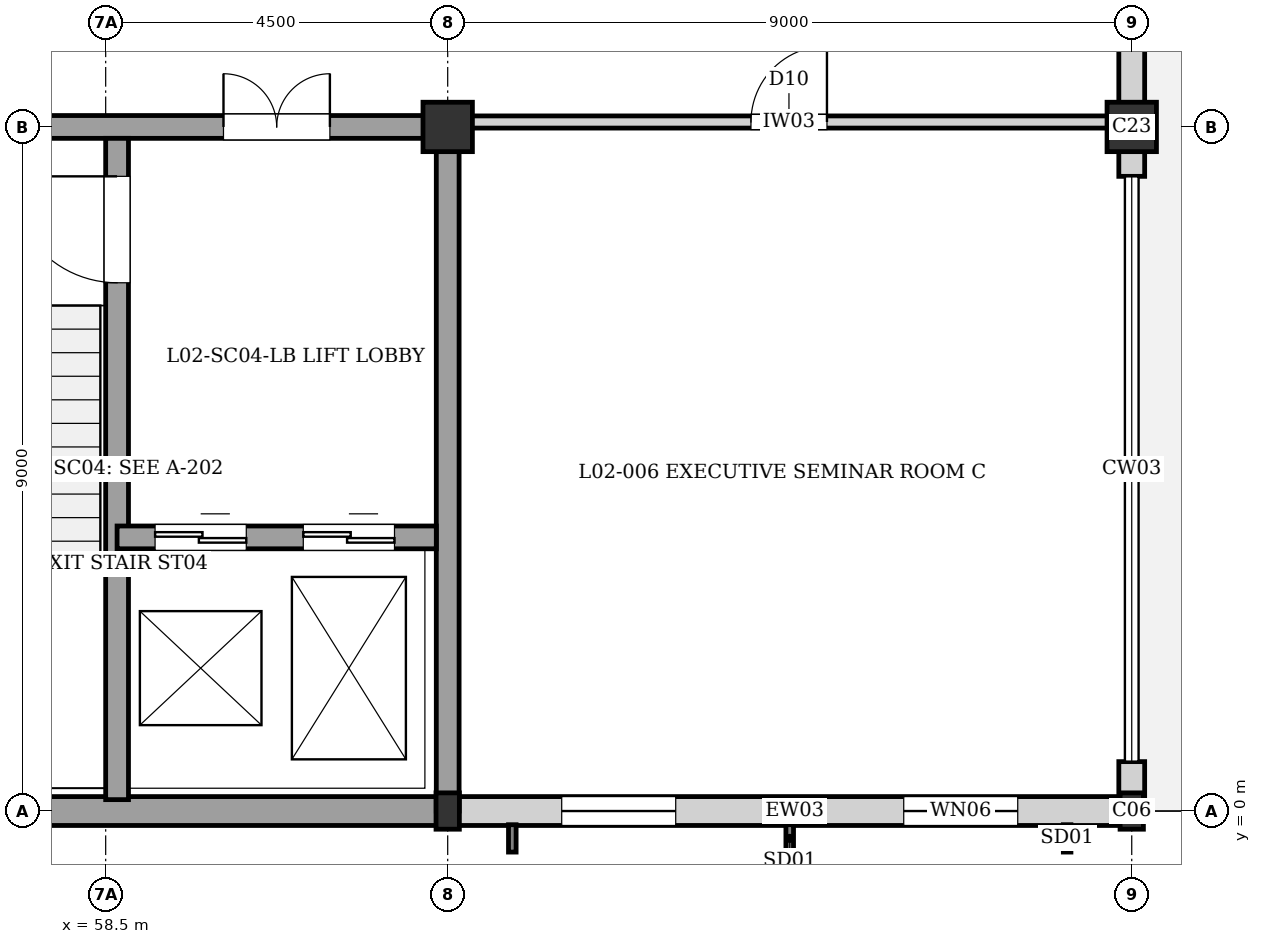
"""IFC4 building model, lengths in metres.
Left out: names, types, materials, properties, quantities, classifications, styles, units other than length and angle.
Written with IfcOpenShell. Run it as: python <this file> out.ifc"""

import sys

from ifc_helpers import new_model, si_unit, direction, frame, frame_2d, origin, origin_2d, place, context, subcontext, project, spatial, rectangle, i_section, extrude, element, fill, save


model = new_model("IFC4")
c1 = context("Model", 3, precision=1e-05, world=origin(), true_north=direction((0.0, 1.0)))
c2 = subcontext(c1, "Body", "Model", "MODEL_VIEW")
j1 = project(units=[si_unit("LENGTHUNIT", "METRE"), si_unit("PLANEANGLEUNIT", "RADIAN")], contexts=[c1])
p1 = place(None, origin())
s1 = spatial("IfcSite", under=j1, at=p1, CompositionType="ELEMENT")
p2 = place(p1, origin())
s2 = spatial("IfcBuilding", under=s1, at=p2, CompositionType="ELEMENT")
p3 = place(p2, frame((0.0, 0.0, 8.16)))
s3 = spatial("IfcBuildingStorey", under=s2, at=p3, CompositionType="ELEMENT", Elevation=8.16)
p4 = place(p3, frame((63.0, 0.0, 0.0), z_axis=(0.0, 0.0, 1.0), x_axis=(1.0, 0.0, 0.0)))
e1 = element("IfcColumn", 1, at=p4, inside=s3, PredefinedType="COLUMN", context=c2, shape_type="SweptSolid", body=[
    extrude(i_section(OverallWidth=0.307, OverallDepth=0.478, WebThickness=0.021, FlangeThickness=0.04, at=origin_2d()), origin(), (0.0, 0.0, 1.0), 3.36),
])
p5 = place(p3, frame((63.0, 9.0, 0.0), z_axis=(0.0, 0.0, 1.0), x_axis=(1.0, 0.0, 0.0)))
e2 = element("IfcColumn", 2, at=p5, inside=s3, PredefinedType="COLUMN", context=c2, shape_type="SweptSolid", body=[
    extrude(rectangle(XDim=0.65, YDim=0.65, at=origin_2d()), origin(), (0.0, 0.0, 1.0), 3.36),
])
p6 = place(p3, frame((72.0, 0.0, 0.0), z_axis=(0.0, 0.0, 1.0), x_axis=(1.0, 0.0, 0.0)))
e3 = element("IfcColumn", 3, at=p6, inside=s3, PredefinedType="COLUMN", context=c2, shape_type="SweptSolid", body=[
    extrude(i_section(OverallWidth=0.307, OverallDepth=0.478, WebThickness=0.021, FlangeThickness=0.04, at=origin_2d()), origin(), (0.0, 0.0, 1.0), 3.36),
])
p7 = place(p3, frame((72.0, 9.0, 0.0), z_axis=(0.0, 0.0, 1.0), x_axis=(1.0, 0.0, 0.0)))
e4 = element("IfcColumn", 4, at=p7, inside=s3, PredefinedType="COLUMN", context=c2, shape_type="SweptSolid", body=[
    extrude(rectangle(XDim=0.65, YDim=0.65, at=origin_2d()), origin(), (0.0, 0.0, 1.0), 3.36),
])
p8 = place(p3, frame((72.0, 17.845, 0.0), z_axis=(0.0, 0.0, 1.0), x_axis=(0.0, -1.0, 0.0)))
e5 = element("IfcWall", 5, at=p8, inside=s3, PredefinedType="SOLIDWALL", context=c2, shape_type="SweptSolid", body=[
    extrude(rectangle(XDim=8.845, YDim=0.34, at=frame_2d((4.422, 0.0))), origin(), (0.0, 0.0, 1.0), 2.74),
])
p9 = place(p8, frame((1.345, 0.0, 0.35)))
e6 = element("IfcOpeningElement", 6, at=p9, cuts=e5, PredefinedType="OPENING", context=c2, shape_type="SweptSolid", body=[
    extrude(rectangle(XDim=1.5, YDim=1.8, at=frame_2d((0.75, 0.9))), frame((0.0, 0.18, 0.0), z_axis=(0.0, -1.0, 0.0), x_axis=(1.0, 0.0, 0.0)), (0.0, 0.0, 1.0), 0.36),
])
p10 = place(p8, frame((5.845, 0.0, 0.35)))
e7 = element("IfcOpeningElement", 7, at=p10, cuts=e5, PredefinedType="OPENING", context=c2, shape_type="SweptSolid", body=[
    extrude(rectangle(XDim=1.5, YDim=1.8, at=frame_2d((0.75, 0.9))), frame((0.0, 0.18, 0.0), z_axis=(0.0, -1.0, 0.0), x_axis=(1.0, 0.0, 0.0)), (0.0, 0.0, 1.0), 0.36),
])
p11 = place(p3, frame((72.0, 9.0, 0.0), z_axis=(0.0, 0.0, 1.0), x_axis=(0.0, -1.0, 0.0)))
e8 = element("IfcWall", 8, at=p11, inside=s3, PredefinedType="SOLIDWALL", context=c2, shape_type="SweptSolid", body=[
    extrude(rectangle(XDim=0.65, YDim=0.34, at=frame_2d((0.325, 0.0))), origin(), (0.0, 0.0, 1.0), 2.8),
])
p12 = place(p3, frame((72.0, 0.65, 0.0), z_axis=(0.0, 0.0, 1.0), x_axis=(0.0, -1.0, 0.0)))
e9 = element("IfcWall", 9, at=p12, inside=s3, PredefinedType="SOLIDWALL", context=c2, shape_type="SweptSolid", body=[
    extrude(rectangle(XDim=0.495, YDim=0.34, at=frame_2d((0.248, 0.0))), origin(), (0.0, 0.0, 1.0), 3.14),
])
p13 = place(p3, frame((72.0, 0.0, 0.0), z_axis=(0.0, 0.0, 1.0), x_axis=(-1.0, 0.0, 0.0)))
e10 = element("IfcWall", 10, at=p13, inside=s3, PredefinedType="SOLIDWALL", context=c2, shape_type="SweptSolid", body=[
    extrude(rectangle(XDim=8.87, YDim=0.38, at=frame_2d((4.435, 0.0))), origin(), (0.0, 0.0, 1.0), 2.7),
])
p14 = place(p13, frame((1.5, 0.0, 0.35)))
e11 = element("IfcOpeningElement", 11, at=p14, cuts=e10, PredefinedType="OPENING", context=c2, shape_type="SweptSolid", body=[
    extrude(rectangle(XDim=1.5, YDim=1.8, at=frame_2d((0.75, 0.9))), frame((0.0, 0.2, 0.0), z_axis=(0.0, -1.0, 0.0), x_axis=(1.0, 0.0, 0.0)), (0.0, 0.0, 1.0), 0.4),
])
p15 = place(p13, frame((6.0, 0.0, 0.35)))
e12 = element("IfcOpeningElement", 12, at=p15, cuts=e10, PredefinedType="OPENING", context=c2, shape_type="SweptSolid", body=[
    extrude(rectangle(XDim=1.5, YDim=1.8, at=frame_2d((0.75, 0.9))), frame((0.0, 0.2, 0.0), z_axis=(0.0, -1.0, 0.0), x_axis=(1.0, 0.0, 0.0)), (0.0, 0.0, 1.0), 0.4),
])
p16 = place(p3, frame((63.0, 0.0, 0.0), z_axis=(0.0, 0.0, 1.0), x_axis=(-1.0, 0.0, 0.0)))
e13 = element("IfcWall", 13, at=p16, inside=s3, PredefinedType="SOLIDWALL", context=c2, shape_type="SweptSolid", body=[
    extrude(rectangle(XDim=9.0, YDim=0.38, at=frame_2d((4.5, 0.0))), origin(), (0.0, 0.0, 1.0), 3.14),
])
p17 = place(p3, frame((63.0, 0.0, 0.0), z_axis=(0.0, 0.0, 1.0), x_axis=(0.0, 1.0, 0.0)))
e14 = element("IfcWall", 14, at=p17, inside=s3, PredefinedType="SHEAR", context=c2, shape_type="SweptSolid", body=[
    extrude(rectangle(XDim=9.0, YDim=0.3, at=frame_2d((4.5, 0.0))), origin(), (0.0, 0.0, 1.0), 3.14),
])
p18 = place(p3, frame((54.0, 9.0, 0.0), z_axis=(0.0, 0.0, 1.0), x_axis=(1.0, 0.0, 0.0)))
e15 = element("IfcWall", 15, at=p18, inside=s3, PredefinedType="SHEAR", context=c2, shape_type="SweptSolid", body=[
    extrude(rectangle(XDim=9.0, YDim=0.3, at=frame_2d((4.5, 0.0))), origin(), (0.0, 0.0, 1.0), 3.14),
])
p19 = place(p18, frame((6.05, 0.0, 0.0)))
e16 = element("IfcOpeningElement", 16, at=p19, cuts=e15, PredefinedType="OPENING", context=c2, shape_type="SweptSolid", body=[
    extrude(rectangle(XDim=1.4, YDim=2.02, at=frame_2d((0.7, 1.01))), frame((0.0, 0.16, 0.0), z_axis=(0.0, -1.0, 0.0), x_axis=(1.0, 0.0, 0.0)), (0.0, 0.0, 1.0), 0.32),
])
p20 = place(p3, frame((58.65, 0.15, 0.0), z_axis=(0.0, 0.0, 1.0), x_axis=(0.0, 1.0, 0.0)))
e17 = element("IfcWall", 17, at=p20, inside=s3, PredefinedType="SHEAR", context=c2, shape_type="SweptSolid", body=[
    extrude(rectangle(XDim=8.7, YDim=0.3, at=frame_2d((4.35, 0.0))), origin(), (0.0, 0.0, 1.0), 3.14),
])
p21 = place(p20, frame((6.8, 0.0, 0.0)))
e18 = element("IfcOpeningElement", 18, at=p21, cuts=e17, PredefinedType="OPENING", context=c2, shape_type="SweptSolid", body=[
    extrude(rectangle(XDim=1.4, YDim=2.02, at=frame_2d((0.7, 1.01))), frame((0.0, 0.16, 0.0), z_axis=(0.0, -1.0, 0.0), x_axis=(1.0, 0.0, 0.0)), (0.0, 0.0, 1.0), 0.32),
])
p22 = place(p3, frame((58.65, 3.6, 0.0), z_axis=(0.0, 0.0, 1.0), x_axis=(1.0, 0.0, 0.0)))
e19 = element("IfcWall", 19, at=p22, inside=s3, PredefinedType="SHEAR", context=c2, shape_type="SweptSolid", body=[
    extrude(rectangle(XDim=4.2, YDim=0.3, at=frame_2d((2.1, 0.0))), origin(), (0.0, 0.0, 1.0), 3.14),
])
p23 = place(p22, frame((0.5, 0.0, 0.0)))
e20 = element("IfcOpeningElement", 20, at=p23, cuts=e19, PredefinedType="OPENING", context=c2, shape_type="SweptSolid", body=[
    extrude(rectangle(XDim=1.2, YDim=2.2, at=frame_2d((0.6, 1.1))), frame((0.0, 0.16, 0.0), z_axis=(0.0, -1.0, 0.0), x_axis=(1.0, 0.0, 0.0)), (0.0, 0.0, 1.0), 0.32),
])
p24 = place(p22, frame((2.45, 0.0, 0.0)))
e21 = element("IfcOpeningElement", 21, at=p24, cuts=e19, PredefinedType="OPENING", context=c2, shape_type="SweptSolid", body=[
    extrude(rectangle(XDim=1.2, YDim=2.2, at=frame_2d((0.6, 1.1))), frame((0.0, 0.16, 0.0), z_axis=(0.0, -1.0, 0.0), x_axis=(1.0, 0.0, 0.0)), (0.0, 0.0, 1.0), 0.32),
])
p25 = place(p3, frame((63.155, 9.065, 0.0), z_axis=(0.0, 0.0, 1.0), x_axis=(1.0, 0.0, 0.0)))
e22 = element("IfcWall", 22, at=p25, inside=s3, PredefinedType="PARTITIONING", context=c2, shape_type="SweptSolid", body=[
    extrude(rectangle(XDim=8.67, YDim=0.16, at=frame_2d((4.335, 0.0))), origin(), (0.0, 0.0, 1.0), 2.74),
])
p26 = place(p25, frame((3.835, 0.0, 0.0)))
e23 = element("IfcOpeningElement", 23, at=p26, cuts=e22, PredefinedType="OPENING", context=c2, shape_type="SweptSolid", body=[
    extrude(rectangle(XDim=1.0, YDim=2.1, at=frame_2d((0.5, 1.05))), frame((0.0, 0.09, 0.0), z_axis=(0.0, -1.0, 0.0), x_axis=(1.0, 0.0, 0.0)), (0.0, 0.0, 1.0), 0.18),
])
p27 = place(p14, origin())
e24 = element("IfcWindow", 24, at=p27, inside=s3, PartitioningType="SINGLE_PANEL", PredefinedType="WINDOW", context=c2, shape_type="SweptSolid", body=[
    extrude(rectangle(XDim=1.5, YDim=1.8, at=frame_2d((0.75, 0.9))), frame((0.0, 0.03, 0.0), z_axis=(0.0, -1.0, 0.0), x_axis=(1.0, 0.0, 0.0)), (0.0, 0.0, 1.0), 0.06),
])
fill(e11, e24)
p28 = place(p15, origin())
e25 = element("IfcWindow", 25, at=p28, inside=s3, PartitioningType="SINGLE_PANEL", PredefinedType="WINDOW", context=c2, shape_type="SweptSolid", body=[
    extrude(rectangle(XDim=1.5, YDim=1.8, at=frame_2d((0.75, 0.9))), frame((0.0, 0.03, 0.0), z_axis=(0.0, -1.0, 0.0), x_axis=(1.0, 0.0, 0.0)), (0.0, 0.0, 1.0), 0.06),
])
fill(e12, e25)
p29 = place(p19, origin())
e26 = element("IfcDoor", 26, at=p29, inside=s3, OperationType="DOUBLE_DOOR_SINGLE_SWING", PredefinedType="DOOR", context=c2, shape_type="SweptSolid", body=[
    extrude(rectangle(XDim=1.4, YDim=2.02, at=frame_2d((0.7, 1.01))), frame((0.0, 0.025, 0.0), z_axis=(0.0, -1.0, 0.0), x_axis=(1.0, 0.0, 0.0)), (0.0, 0.0, 1.0), 0.05),
])
fill(e16, e26)
p30 = place(p21, origin())
e27 = element("IfcDoor", 27, at=p30, inside=s3, OperationType="SINGLE_SWING_RIGHT", PredefinedType="DOOR", context=c2, shape_type="SweptSolid", body=[
    extrude(rectangle(XDim=1.4, YDim=2.02, at=frame_2d((0.7, 1.01))), frame((0.0, 0.025, 0.0), z_axis=(0.0, -1.0, 0.0), x_axis=(1.0, 0.0, 0.0)), (0.0, 0.0, 1.0), 0.05),
])
fill(e18, e27)
p31 = place(p23, origin())
e28 = element("IfcDoor", 28, at=p31, inside=s3, OperationType="DOUBLE_DOOR_SLIDING", PredefinedType="DOOR", context=c2, shape_type="SweptSolid", body=[
    extrude(rectangle(XDim=1.2, YDim=2.2, at=frame_2d((0.6, 1.1))), frame((0.0, 0.025, 0.0), z_axis=(0.0, -1.0, 0.0), x_axis=(1.0, 0.0, 0.0)), (0.0, 0.0, 1.0), 0.05),
])
fill(e20, e28)
p32 = place(p24, origin())
e29 = element("IfcDoor", 29, at=p32, inside=s3, OperationType="DOUBLE_DOOR_SLIDING", PredefinedType="DOOR", context=c2, shape_type="SweptSolid", body=[
    extrude(rectangle(XDim=1.2, YDim=2.2, at=frame_2d((0.6, 1.1))), frame((0.0, 0.025, 0.0), z_axis=(0.0, -1.0, 0.0), x_axis=(1.0, 0.0, 0.0)), (0.0, 0.0, 1.0), 0.05),
])
fill(e21, e29)
p33 = place(p26, origin())
e30 = element("IfcDoor", 30, at=p33, inside=s3, OperationType="SINGLE_SWING_RIGHT", PredefinedType="DOOR", context=c2, shape_type="SweptSolid", body=[
    extrude(rectangle(XDim=1.0, YDim=2.1, at=frame_2d((0.5, 1.05))), frame((0.0, 0.025, 0.0), z_axis=(0.0, -1.0, 0.0), x_axis=(1.0, 0.0, 0.0)), (0.0, 0.0, 1.0), 0.05),
])
fill(e23, e30)
save(model, sys.argv[1])
